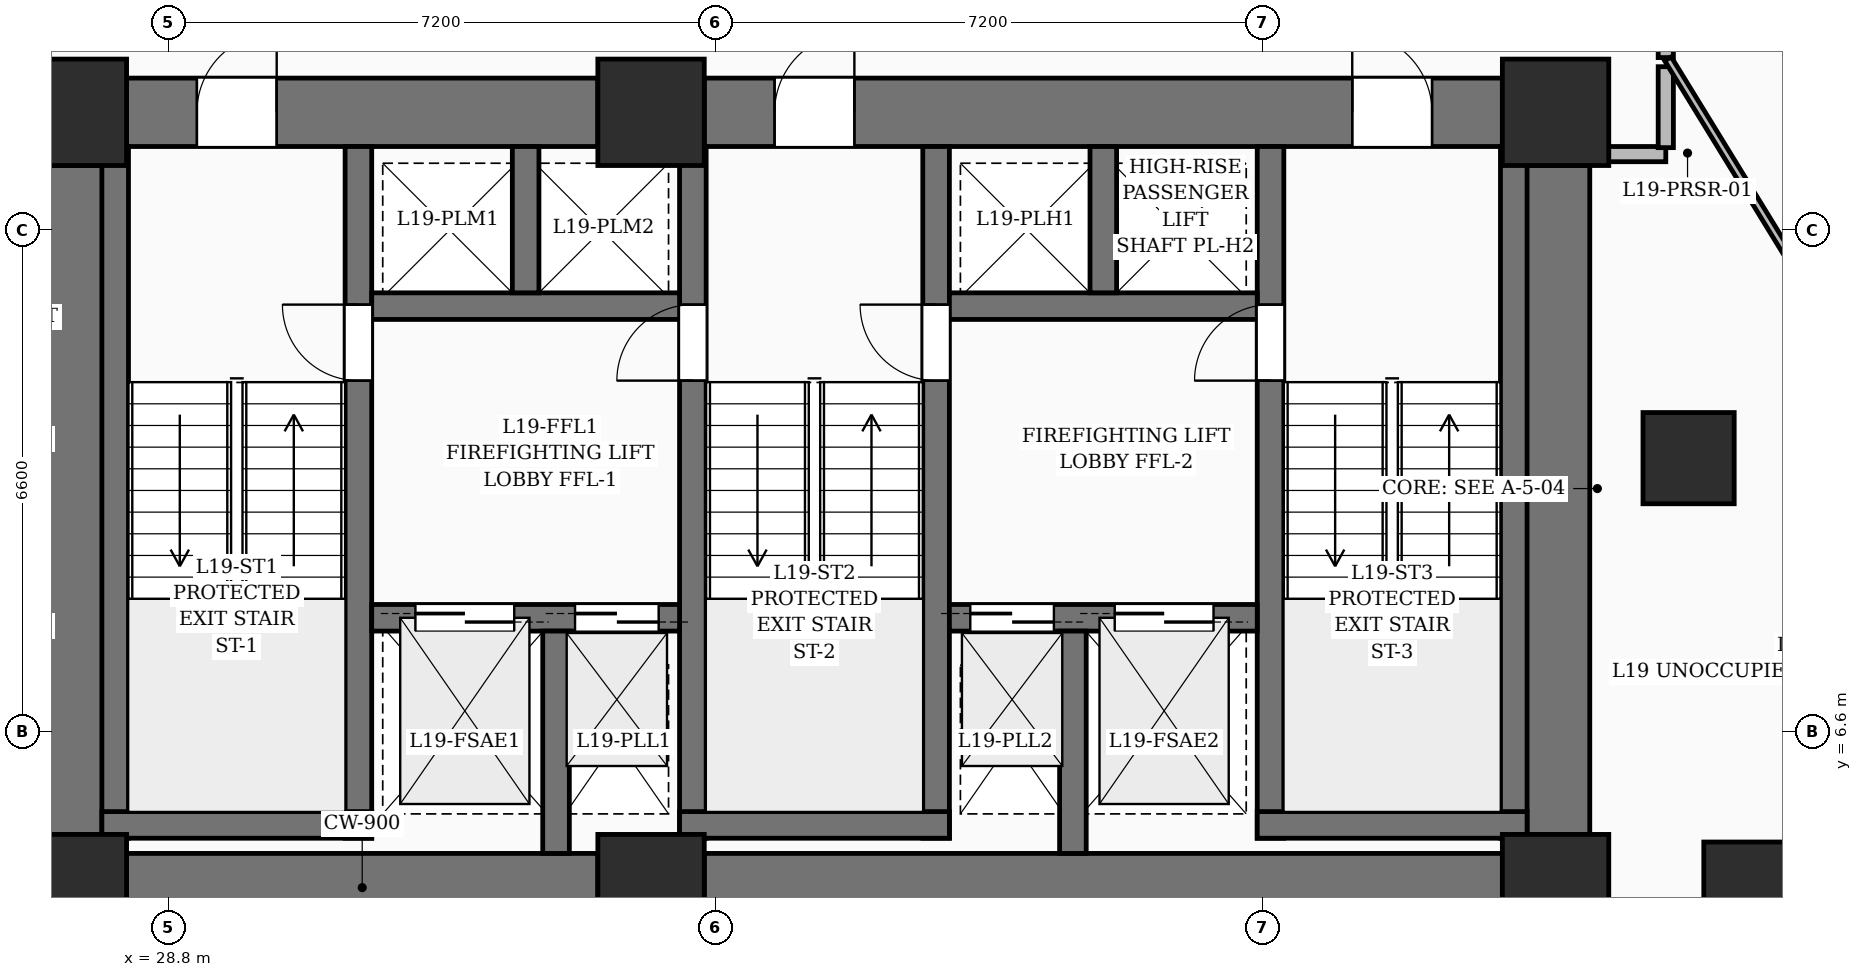
"""IFC4 building model, lengths in metres.
Left out: names, types, materials, properties, quantities, classifications, styles, units other than length and angle.
Written with IfcOpenShell. Run it as: python <this file> out.ifc"""

import sys

from ifc_helpers import new_model, si_unit, direction, frame, frame_2d, origin, origin_2d, place, context, subcontext, project, spatial, rectangle, extrude, element, fill, save


model = new_model("IFC4")
c1 = context("Model", 3, precision=1e-05, world=origin(), true_north=direction((0.0, 1.0)))
c2 = subcontext(c1, "Body", "Model", "MODEL_VIEW")
j1 = project(units=[si_unit("LENGTHUNIT", "METRE"), si_unit("PLANEANGLEUNIT", "RADIAN")], contexts=[c1])
p1 = place(None, origin())
s1 = spatial("IfcSite", under=j1, at=p1, CompositionType="ELEMENT")
p2 = place(p1, origin())
s2 = spatial("IfcBuilding", under=s1, at=p2, CompositionType="ELEMENT")
p3 = place(p2, frame((0.0, 0.0, 78.6)))
s3 = spatial("IfcBuildingStorey", under=s2, at=p3, CompositionType="ELEMENT", Elevation=78.6)
for number, where, z_axis, x_axis in (
    (1, (27.55, 4.55, 0.0), (0.0, 0.0, 1.0), (1.0, 0.0, 0.0)),
    (2, (35.15, 4.55, 0.0), (0.0, 0.0, 1.0), (1.0, 0.0, 0.0)),
    (3, (47.05, 4.55, 0.0), (0.0, 0.0, 1.0), (1.0, 0.0, 0.0)),
    (4, (27.55, 14.75, 0.0), (0.0, 0.0, 1.0), (1.0, 0.0, 0.0)),
    (5, (35.15, 14.75, 0.0), (0.0, 0.0, 1.0), (1.0, 0.0, 0.0)),
    (6, (47.05, 14.75, 0.0), (0.0, 0.0, 1.0), (1.0, 0.0, 0.0)),
):
    element("IfcColumn", number, at=place(p3, frame(where, z_axis=z_axis, x_axis=x_axis)), inside=s3, PredefinedType="COLUMN", context=c2, shape_type="SweptSolid", body=[
        extrude(rectangle(XDim=1.4, YDim=1.4, at=origin_2d()), origin(), (0.0, 0.0, 1.0), 3.6),
    ])
for number, where, z_axis, x_axis in (
    (7, (49.6, 4.55, 0.0), (0.0, 0.0, 1.0), (1.0, 0.0, 0.0)),
    (8, (48.8, 10.2, 0.0), (0.0, 0.0, 1.0), (1.0, 0.0, 0.0)),
):
    element("IfcColumn", number, at=place(p3, frame(where, z_axis=z_axis, x_axis=x_axis)), inside=s3, PredefinedType="COLUMN", context=c2, shape_type="SweptSolid", body=[
        extrude(rectangle(XDim=1.2, YDim=1.2, at=origin_2d()), origin(), (0.0, 0.0, 1.0), 3.6),
    ])
p4 = place(p3, frame((28.25, 4.55, 0.0), z_axis=(0.0, 0.0, 1.0), x_axis=(1.0, 0.0, 0.0)))
e9 = element("IfcWall", 9, at=p4, inside=s3, PredefinedType="SHEAR", context=c2, shape_type="SweptSolid", body=[
    extrude(rectangle(XDim=6.2, YDim=0.9, at=frame_2d((3.1, 0.0))), origin(), (0.0, 0.0, 1.0), 3.6),
])
p5 = place(p3, frame((35.85, 4.55, 0.0), z_axis=(0.0, 0.0, 1.0), x_axis=(1.0, 0.0, 0.0)))
e10 = element("IfcWall", 10, at=p5, inside=s3, PredefinedType="SHEAR", context=c2, shape_type="SweptSolid", body=[
    extrude(rectangle(XDim=10.5, YDim=0.9, at=frame_2d((5.25, 0.0))), origin(), (0.0, 0.0, 1.0), 3.6),
])
p6 = place(p3, frame((28.25, 14.75, 0.0), z_axis=(0.0, 0.0, 1.0), x_axis=(1.0, 0.0, 0.0)))
e11 = element("IfcWall", 11, at=p6, inside=s3, PredefinedType="SHEAR", context=c2, shape_type="SweptSolid", body=[
    extrude(rectangle(XDim=6.2, YDim=0.9, at=frame_2d((3.1, 0.0))), origin(), (0.0, 0.0, 1.0), 3.6),
])
p7 = place(p6, frame((0.925, 0.0, 0.0)))
e12 = element("IfcOpeningElement", 12, at=p7, cuts=e11, PredefinedType="OPENING", context=c2, shape_type="SweptSolid", body=[
    extrude(rectangle(XDim=1.05, YDim=2.15, at=frame_2d((0.525, 1.075))), frame((0.0, 0.46, 0.0), z_axis=(0.0, -1.0, 0.0), x_axis=(1.0, 0.0, 0.0)), (0.0, 0.0, 1.0), 0.92),
])
p8 = place(p3, frame((35.85, 14.75, 0.0), z_axis=(0.0, 0.0, 1.0), x_axis=(1.0, 0.0, 0.0)))
e13 = element("IfcWall", 13, at=p8, inside=s3, PredefinedType="SHEAR", context=c2, shape_type="SweptSolid", body=[
    extrude(rectangle(XDim=10.5, YDim=0.9, at=frame_2d((5.25, 0.0))), origin(), (0.0, 0.0, 1.0), 3.6),
])
p9 = place(p8, frame((0.925, 0.0, 0.0)))
e14 = element("IfcOpeningElement", 14, at=p9, cuts=e13, PredefinedType="OPENING", context=c2, shape_type="SweptSolid", body=[
    extrude(rectangle(XDim=1.05, YDim=2.15, at=frame_2d((0.525, 1.075))), frame((0.0, 0.46, 0.0), z_axis=(0.0, -1.0, 0.0), x_axis=(1.0, 0.0, 0.0)), (0.0, 0.0, 1.0), 0.92),
])
p10 = place(p8, frame((8.525, 0.0, 0.0)))
e15 = element("IfcOpeningElement", 15, at=p10, cuts=e13, PredefinedType="OPENING", context=c2, shape_type="SweptSolid", body=[
    extrude(rectangle(XDim=1.05, YDim=2.15, at=frame_2d((0.525, 1.075))), frame((0.0, 0.46, 0.0), z_axis=(0.0, -1.0, 0.0), x_axis=(1.0, 0.0, 0.0)), (0.0, 0.0, 1.0), 0.92),
])
for number, where, z_axis, x_axis in (
    (16, (27.55, 5.25, 0.0), (0.0, 0.0, 1.0), (0.0, 1.0, 0.0)),
    (17, (47.05, 5.25, 0.0), (0.0, 0.0, 1.0), (0.0, 1.0, 0.0)),
):
    element("IfcWall", number, at=place(p3, frame(where, z_axis=z_axis, x_axis=x_axis)), inside=s3, PredefinedType="SHEAR", context=c2, shape_type="SweptSolid", body=[
        extrude(rectangle(XDim=8.8, YDim=0.9, at=frame_2d((4.4, 0.0))), origin(), (0.0, 0.0, 1.0), 3.6),
    ])
p11 = place(p3, frame((28.1, 5.2, 0.0), z_axis=(0.0, 0.0, 1.0), x_axis=(0.0, 1.0, 0.0)))
e18 = element("IfcWall", 18, at=p11, inside=s3, PredefinedType="SOLIDWALL", context=c2, shape_type="SweptSolid", body=[
    extrude(rectangle(XDim=9.1, YDim=0.35, at=frame_2d((4.55, 0.0))), origin(), (0.0, 0.0, 1.0), 3.6),
])
p12 = place(p3, frame((31.3, 5.2, 0.0), z_axis=(0.0, 0.0, 1.0), x_axis=(0.0, 1.0, 0.0)))
e19 = element("IfcWall", 19, at=p12, inside=s3, PredefinedType="SOLIDWALL", context=c2, shape_type="SweptSolid", body=[
    extrude(rectangle(XDim=9.1, YDim=0.35, at=frame_2d((4.55, 0.0))), origin(), (0.0, 0.0, 1.0), 3.6),
])
p13 = place(p12, frame((6.02, 0.0, 0.0)))
e20 = element("IfcOpeningElement", 20, at=p13, cuts=e19, PredefinedType="OPENING", context=c2, shape_type="SweptSolid", body=[
    extrude(rectangle(XDim=1.0, YDim=2.15, at=frame_2d((0.5, 1.075))), frame((0.0, 0.185, 0.0), z_axis=(0.0, -1.0, 0.0), x_axis=(1.0, 0.0, 0.0)), (0.0, 0.0, 1.0), 0.37),
])
p14 = place(p3, frame((27.925, 5.375, 0.0), z_axis=(0.0, 0.0, 1.0), x_axis=(1.0, 0.0, 0.0)))
e21 = element("IfcWall", 21, at=p14, inside=s3, PredefinedType="SOLIDWALL", context=c2, shape_type="SweptSolid", body=[
    extrude(rectangle(XDim=3.55, YDim=0.35, at=frame_2d((1.775, 0.0))), origin(), (0.0, 0.0, 1.0), 3.6),
])
p15 = place(p3, frame((35.7, 5.2, 0.0), z_axis=(0.0, 0.0, 1.0), x_axis=(0.0, 1.0, 0.0)))
e22 = element("IfcWall", 22, at=p15, inside=s3, PredefinedType="SOLIDWALL", context=c2, shape_type="SweptSolid", body=[
    extrude(rectangle(XDim=9.1, YDim=0.35, at=frame_2d((4.55, 0.0))), origin(), (0.0, 0.0, 1.0), 3.6),
])
p16 = place(p15, frame((6.02, 0.0, 0.0)))
e23 = element("IfcOpeningElement", 23, at=p16, cuts=e22, PredefinedType="OPENING", context=c2, shape_type="SweptSolid", body=[
    extrude(rectangle(XDim=1.0, YDim=2.15, at=frame_2d((0.5, 1.075))), frame((0.0, 0.185, 0.0), z_axis=(0.0, -1.0, 0.0), x_axis=(1.0, 0.0, 0.0)), (0.0, 0.0, 1.0), 0.37),
])
p17 = place(p3, frame((38.9, 5.2, 0.0), z_axis=(0.0, 0.0, 1.0), x_axis=(0.0, 1.0, 0.0)))
e24 = element("IfcWall", 24, at=p17, inside=s3, PredefinedType="SOLIDWALL", context=c2, shape_type="SweptSolid", body=[
    extrude(rectangle(XDim=9.1, YDim=0.35, at=frame_2d((4.55, 0.0))), origin(), (0.0, 0.0, 1.0), 3.6),
])
p18 = place(p17, frame((6.02, 0.0, 0.0)))
e25 = element("IfcOpeningElement", 25, at=p18, cuts=e24, PredefinedType="OPENING", context=c2, shape_type="SweptSolid", body=[
    extrude(rectangle(XDim=1.0, YDim=2.15, at=frame_2d((0.5, 1.075))), frame((0.0, 0.185, 0.0), z_axis=(0.0, -1.0, 0.0), x_axis=(1.0, 0.0, 0.0)), (0.0, 0.0, 1.0), 0.37),
])
p19 = place(p3, frame((35.525, 5.375, 0.0), z_axis=(0.0, 0.0, 1.0), x_axis=(1.0, 0.0, 0.0)))
e26 = element("IfcWall", 26, at=p19, inside=s3, PredefinedType="SOLIDWALL", context=c2, shape_type="SweptSolid", body=[
    extrude(rectangle(XDim=3.55, YDim=0.35, at=frame_2d((1.775, 0.0))), origin(), (0.0, 0.0, 1.0), 3.6),
])
p20 = place(p3, frame((43.3, 5.2, 0.0), z_axis=(0.0, 0.0, 1.0), x_axis=(0.0, 1.0, 0.0)))
e27 = element("IfcWall", 27, at=p20, inside=s3, PredefinedType="SOLIDWALL", context=c2, shape_type="SweptSolid", body=[
    extrude(rectangle(XDim=9.1, YDim=0.35, at=frame_2d((4.55, 0.0))), origin(), (0.0, 0.0, 1.0), 3.6),
])
p21 = place(p20, frame((6.02, 0.0, 0.0)))
e28 = element("IfcOpeningElement", 28, at=p21, cuts=e27, PredefinedType="OPENING", context=c2, shape_type="SweptSolid", body=[
    extrude(rectangle(XDim=1.0, YDim=2.15, at=frame_2d((0.5, 1.075))), frame((0.0, 0.185, 0.0), z_axis=(0.0, -1.0, 0.0), x_axis=(1.0, 0.0, 0.0)), (0.0, 0.0, 1.0), 0.37),
])
p22 = place(p3, frame((46.5, 5.2, 0.0), z_axis=(0.0, 0.0, 1.0), x_axis=(0.0, 1.0, 0.0)))
e29 = element("IfcWall", 29, at=p22, inside=s3, PredefinedType="SOLIDWALL", context=c2, shape_type="SweptSolid", body=[
    extrude(rectangle(XDim=9.1, YDim=0.35, at=frame_2d((4.55, 0.0))), origin(), (0.0, 0.0, 1.0), 3.6),
])
p23 = place(p3, frame((43.125, 5.375, 0.0), z_axis=(0.0, 0.0, 1.0), x_axis=(1.0, 0.0, 0.0)))
e30 = element("IfcWall", 30, at=p23, inside=s3, PredefinedType="SOLIDWALL", context=c2, shape_type="SweptSolid", body=[
    extrude(rectangle(XDim=3.55, YDim=0.35, at=frame_2d((1.775, 0.0))), origin(), (0.0, 0.0, 1.0), 3.6),
])
p24 = place(p3, frame((31.475, 8.1, 0.0), z_axis=(0.0, 0.0, 1.0), x_axis=(1.0, 0.0, 0.0)))
e31 = element("IfcWall", 31, at=p24, inside=s3, PredefinedType="SOLIDWALL", context=c2, shape_type="SweptSolid", body=[
    extrude(rectangle(XDim=4.05, YDim=0.35, at=frame_2d((2.025, 0.0))), origin(), (0.0, 0.0, 1.0), 3.6),
])
p25 = place(p24, frame((0.575, 0.0, 0.0)))
e32 = element("IfcOpeningElement", 32, at=p25, cuts=e31, PredefinedType="OPENING", context=c2, shape_type="SweptSolid", body=[
    extrude(rectangle(XDim=1.3, YDim=2.25, at=frame_2d((0.65, 1.125))), frame((0.0, 0.185, 0.0), z_axis=(0.0, -1.0, 0.0), x_axis=(1.0, 0.0, 0.0)), (0.0, 0.0, 1.0), 0.37),
])
p26 = place(p24, frame((2.675, 0.0, 0.0)))
e33 = element("IfcOpeningElement", 33, at=p26, cuts=e31, PredefinedType="OPENING", context=c2, shape_type="SweptSolid", body=[
    extrude(rectangle(XDim=1.1, YDim=2.2, at=frame_2d((0.55, 1.1))), frame((0.0, 0.185, 0.0), z_axis=(0.0, -1.0, 0.0), x_axis=(1.0, 0.0, 0.0)), (0.0, 0.0, 1.0), 0.37),
])
p27 = place(p3, frame((39.075, 8.1, 0.0), z_axis=(0.0, 0.0, 1.0), x_axis=(1.0, 0.0, 0.0)))
e34 = element("IfcWall", 34, at=p27, inside=s3, PredefinedType="SOLIDWALL", context=c2, shape_type="SweptSolid", body=[
    extrude(rectangle(XDim=4.05, YDim=0.35, at=frame_2d((2.025, 0.0))), origin(), (0.0, 0.0, 1.0), 3.6),
])
p28 = place(p27, frame((2.175, 0.0, 0.0)))
e35 = element("IfcOpeningElement", 35, at=p28, cuts=e34, PredefinedType="OPENING", context=c2, shape_type="SweptSolid", body=[
    extrude(rectangle(XDim=1.3, YDim=2.25, at=frame_2d((0.65, 1.125))), frame((0.0, 0.185, 0.0), z_axis=(0.0, -1.0, 0.0), x_axis=(1.0, 0.0, 0.0)), (0.0, 0.0, 1.0), 0.37),
])
p29 = place(p27, frame((0.275, 0.0, 0.0)))
e36 = element("IfcOpeningElement", 36, at=p29, cuts=e34, PredefinedType="OPENING", context=c2, shape_type="SweptSolid", body=[
    extrude(rectangle(XDim=1.1, YDim=2.2, at=frame_2d((0.55, 1.1))), frame((0.0, 0.185, 0.0), z_axis=(0.0, -1.0, 0.0), x_axis=(1.0, 0.0, 0.0)), (0.0, 0.0, 1.0), 0.37),
])
for number, where, z_axis, x_axis in (
    (37, (33.9, 5.0, 0.0), (0.0, 0.0, 1.0), (0.0, 1.0, 0.0)),
    (38, (40.7, 5.0, 0.0), (0.0, 0.0, 1.0), (0.0, 1.0, 0.0)),
):
    element("IfcWall", number, at=place(p3, frame(where, z_axis=z_axis, x_axis=x_axis)), inside=s3, PredefinedType="SOLIDWALL", context=c2, shape_type="SweptSolid", body=[
        extrude(rectangle(XDim=2.925, YDim=0.35, at=frame_2d((1.462, 0.0))), origin(), (0.0, 0.0, 1.0), 3.6),
    ])
p30 = place(p3, frame((31.475, 12.2, 0.0), z_axis=(0.0, 0.0, 1.0), x_axis=(1.0, 0.0, 0.0)))
e39 = element("IfcWall", 39, at=p30, inside=s3, PredefinedType="SOLIDWALL", context=c2, shape_type="SweptSolid", body=[
    extrude(rectangle(XDim=4.05, YDim=0.35, at=frame_2d((2.025, 0.0))), origin(), (0.0, 0.0, 1.0), 3.6),
])
p31 = place(p3, frame((33.5, 12.375, 0.0), z_axis=(0.0, 0.0, 1.0), x_axis=(0.0, 1.0, 0.0)))
e40 = element("IfcWall", 40, at=p31, inside=s3, PredefinedType="SOLIDWALL", context=c2, shape_type="SweptSolid", body=[
    extrude(rectangle(XDim=1.925, YDim=0.35, at=frame_2d((0.962, 0.0))), origin(), (0.0, 0.0, 1.0), 3.6),
])
p32 = place(p3, frame((39.075, 12.2, 0.0), z_axis=(0.0, 0.0, 1.0), x_axis=(1.0, 0.0, 0.0)))
e41 = element("IfcWall", 41, at=p32, inside=s3, PredefinedType="SOLIDWALL", context=c2, shape_type="SweptSolid", body=[
    extrude(rectangle(XDim=4.05, YDim=0.35, at=frame_2d((2.025, 0.0))), origin(), (0.0, 0.0, 1.0), 3.6),
])
p33 = place(p3, frame((41.1, 12.375, 0.0), z_axis=(0.0, 0.0, 1.0), x_axis=(0.0, 1.0, 0.0)))
e42 = element("IfcWall", 42, at=p33, inside=s3, PredefinedType="SOLIDWALL", context=c2, shape_type="SweptSolid", body=[
    extrude(rectangle(XDim=1.925, YDim=0.35, at=frame_2d((0.962, 0.0))), origin(), (0.0, 0.0, 1.0), 3.6),
])
p34 = place(p3, frame((47.5, 14.2, 0.0), z_axis=(0.0, 0.0, 1.0), x_axis=(1.0, 0.0, 0.0)))
e43 = element("IfcWall", 43, at=p34, inside=s3, PredefinedType="PARTITIONING", context=c2, shape_type="SweptSolid", body=[
    extrude(rectangle(XDim=1.0, YDim=0.2, at=frame_2d((0.5, 0.0))), origin(), (0.0, 0.0, 1.0), 3.35),
])
p35 = place(p3, frame((48.5, 14.285, 0.0), z_axis=(0.0, 0.0, 1.0), x_axis=(0.0, 1.0, 0.0)))
e44 = element("IfcWall", 44, at=p35, inside=s3, PredefinedType="PARTITIONING", context=c2, shape_type="SweptSolid", body=[
    extrude(rectangle(XDim=1.065, YDim=0.2, at=frame_2d((0.533, 0.0))), origin(), (0.0, 0.0, 1.0), 3.35),
])
p36 = place(p3, frame((48.5, 15.47, 0.0), z_axis=(0.0, 0.0, 1.0), x_axis=(0.0, 1.0, 0.0)))
e45 = element("IfcWall", 45, at=p36, inside=s3, PredefinedType="PARTITIONING", context=c2, shape_type="SweptSolid", body=[
    extrude(rectangle(XDim=2.28, YDim=0.2, at=frame_2d((1.14, 0.0))), origin(), (0.0, 0.0, 1.0), 2.345),
])
p37 = place(p36, frame((0.69, 0.0, 0.0)))
e46 = element("IfcOpeningElement", 46, at=p37, cuts=e45, PredefinedType="OPENING", context=c2, shape_type="SweptSolid", body=[
    extrude(rectangle(XDim=0.9, YDim=2.1, at=frame_2d((0.45, 1.05))), frame((0.0, 0.11, 0.0), z_axis=(0.0, -1.0, 0.0), x_axis=(1.0, 0.0, 0.0)), (0.0, 0.0, 1.0), 0.22),
])
p38 = place(p3, frame((48.529, 15.453, 0.0), z_axis=(0.0, 0.0, 1.0), x_axis=(0.52306290803, -0.852294077325, 0.0)))
e47 = element("IfcWall", 47, at=p38, inside=s3, PredefinedType="PARTITIONING", context=c2, shape_type="SweptSolid", body=[
    extrude(rectangle(XDim=15.885, YDim=0.1, at=frame_2d((7.943, 0.0))), origin(), (0.0, 0.0, 1.0), 2.345),
])
p39 = place(p7, origin())
e48 = element("IfcDoor", 48, at=p39, inside=s3, OperationType="SINGLE_SWING_RIGHT", PredefinedType="DOOR", context=c2, shape_type="SweptSolid", body=[
    extrude(rectangle(XDim=1.05, YDim=2.15, at=frame_2d((0.525, 1.075))), frame((0.0, 0.025, 0.0), z_axis=(0.0, -1.0, 0.0), x_axis=(1.0, 0.0, 0.0)), (0.0, 0.0, 1.0), 0.05),
])
fill(e12, e48)
p40 = place(p9, origin())
e49 = element("IfcDoor", 49, at=p40, inside=s3, OperationType="SINGLE_SWING_RIGHT", PredefinedType="DOOR", context=c2, shape_type="SweptSolid", body=[
    extrude(rectangle(XDim=1.05, YDim=2.15, at=frame_2d((0.525, 1.075))), frame((0.0, 0.025, 0.0), z_axis=(0.0, -1.0, 0.0), x_axis=(1.0, 0.0, 0.0)), (0.0, 0.0, 1.0), 0.05),
])
fill(e14, e49)
p41 = place(p10, origin())
e50 = element("IfcDoor", 50, at=p41, inside=s3, OperationType="SINGLE_SWING_LEFT", PredefinedType="DOOR", context=c2, shape_type="SweptSolid", body=[
    extrude(rectangle(XDim=1.05, YDim=2.15, at=frame_2d((0.525, 1.075))), frame((0.0, 0.025, 0.0), z_axis=(0.0, -1.0, 0.0), x_axis=(1.0, 0.0, 0.0)), (0.0, 0.0, 1.0), 0.05),
])
fill(e15, e50)
p42 = place(p13, origin())
e51 = element("IfcDoor", 51, at=p42, inside=s3, OperationType="SINGLE_SWING_RIGHT", PredefinedType="DOOR", context=c2, shape_type="SweptSolid", body=[
    extrude(rectangle(XDim=1.0, YDim=2.15, at=frame_2d((0.5, 1.075))), frame((0.0, 0.025, 0.0), z_axis=(0.0, -1.0, 0.0), x_axis=(1.0, 0.0, 0.0)), (0.0, 0.0, 1.0), 0.05),
])
fill(e20, e51)
p43 = place(p16, origin())
e52 = element("IfcDoor", 52, at=p43, inside=s3, OperationType="SINGLE_SWING_LEFT", PredefinedType="DOOR", context=c2, shape_type="SweptSolid", body=[
    extrude(rectangle(XDim=1.0, YDim=2.15, at=frame_2d((0.5, 1.075))), frame((0.0, 0.025, 0.0), z_axis=(0.0, -1.0, 0.0), x_axis=(1.0, 0.0, 0.0)), (0.0, 0.0, 1.0), 0.05),
])
fill(e23, e52)
p44 = place(p18, origin())
e53 = element("IfcDoor", 53, at=p44, inside=s3, OperationType="SINGLE_SWING_RIGHT", PredefinedType="DOOR", context=c2, shape_type="SweptSolid", body=[
    extrude(rectangle(XDim=1.0, YDim=2.15, at=frame_2d((0.5, 1.075))), frame((0.0, 0.025, 0.0), z_axis=(0.0, -1.0, 0.0), x_axis=(1.0, 0.0, 0.0)), (0.0, 0.0, 1.0), 0.05),
])
fill(e25, e53)
p45 = place(p21, origin())
e54 = element("IfcDoor", 54, at=p45, inside=s3, OperationType="SINGLE_SWING_LEFT", PredefinedType="DOOR", context=c2, shape_type="SweptSolid", body=[
    extrude(rectangle(XDim=1.0, YDim=2.15, at=frame_2d((0.5, 1.075))), frame((0.0, 0.025, 0.0), z_axis=(0.0, -1.0, 0.0), x_axis=(1.0, 0.0, 0.0)), (0.0, 0.0, 1.0), 0.05),
])
fill(e28, e54)
p46 = place(p25, origin())
e55 = element("IfcDoor", 55, at=p46, inside=s3, OperationType="DOUBLE_DOOR_SLIDING", PredefinedType="DOOR", context=c2, shape_type="SweptSolid", body=[
    extrude(rectangle(XDim=1.3, YDim=2.25, at=frame_2d((0.65, 1.125))), frame((0.0, 0.025, 0.0), z_axis=(0.0, -1.0, 0.0), x_axis=(1.0, 0.0, 0.0)), (0.0, 0.0, 1.0), 0.05),
])
fill(e32, e55)
p47 = place(p28, origin())
e56 = element("IfcDoor", 56, at=p47, inside=s3, OperationType="DOUBLE_DOOR_SLIDING", PredefinedType="DOOR", context=c2, shape_type="SweptSolid", body=[
    extrude(rectangle(XDim=1.3, YDim=2.25, at=frame_2d((0.65, 1.125))), frame((0.0, 0.025, 0.0), z_axis=(0.0, -1.0, 0.0), x_axis=(1.0, 0.0, 0.0)), (0.0, 0.0, 1.0), 0.05),
])
fill(e35, e56)
p48 = place(p26, origin())
e57 = element("IfcDoor", 57, at=p48, inside=s3, OperationType="DOUBLE_DOOR_SLIDING", PredefinedType="DOOR", context=c2, shape_type="SweptSolid", body=[
    extrude(rectangle(XDim=1.1, YDim=2.2, at=frame_2d((0.55, 1.1))), frame((0.0, 0.025, 0.0), z_axis=(0.0, -1.0, 0.0), x_axis=(1.0, 0.0, 0.0)), (0.0, 0.0, 1.0), 0.05),
])
fill(e33, e57)
p49 = place(p29, origin())
e58 = element("IfcDoor", 58, at=p49, inside=s3, OperationType="DOUBLE_DOOR_SLIDING", PredefinedType="DOOR", context=c2, shape_type="SweptSolid", body=[
    extrude(rectangle(XDim=1.1, YDim=2.2, at=frame_2d((0.55, 1.1))), frame((0.0, 0.025, 0.0), z_axis=(0.0, -1.0, 0.0), x_axis=(1.0, 0.0, 0.0)), (0.0, 0.0, 1.0), 0.05),
])
fill(e36, e58)
save(model, sys.argv[1])
